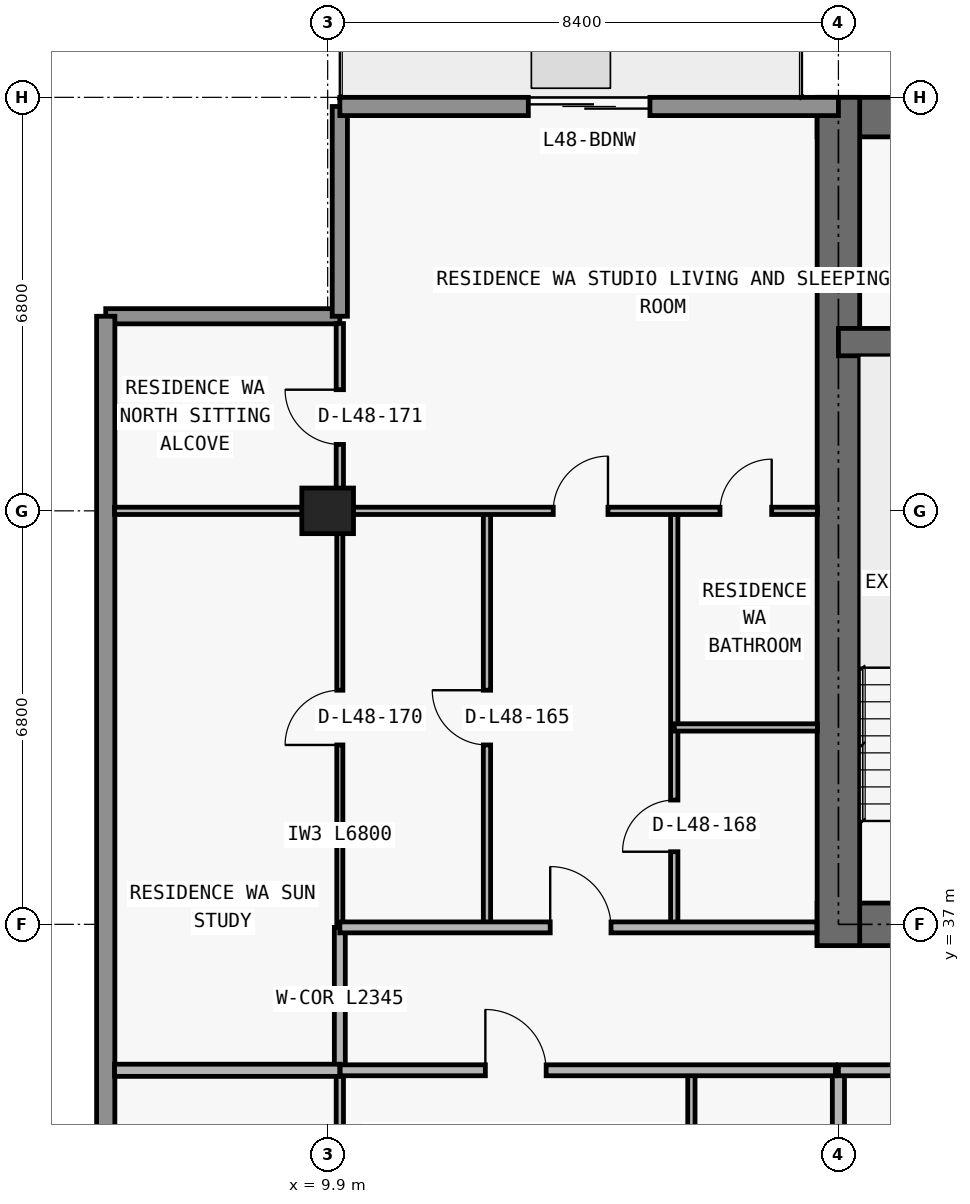
"""IFC4 building model, lengths in metres.
Left out: names, types, materials, properties, quantities, classifications, styles, units other than length and angle.
Written with IfcOpenShell. Run it as: python <this file> out.ifc"""

import sys

from ifc_helpers import new_model, si_unit, direction, frame, frame_2d, origin, origin_2d, place, context, subcontext, project, spatial, rectangle, extrude, element, fill, save


model = new_model("IFC4")
c1 = context("Model", 3, precision=1e-05, world=origin(), true_north=direction((0.0, 1.0)))
c2 = subcontext(c1, "Body", "Model", "MODEL_VIEW")
j1 = project(units=[si_unit("LENGTHUNIT", "METRE"), si_unit("PLANEANGLEUNIT", "RADIAN")], contexts=[c1])
p1 = place(None, origin())
s1 = spatial("IfcSite", under=j1, at=p1, CompositionType="ELEMENT")
p2 = place(p1, origin())
s2 = spatial("IfcBuilding", under=s1, at=p2, CompositionType="ELEMENT")
p3 = place(p2, frame((0.0, 0.0, 173.7)))
s3 = spatial("IfcBuildingStorey", under=s2, at=p3, CompositionType="ELEMENT", Elevation=173.7)
p4 = place(p3, frame((9.9, 43.8, 0.0), z_axis=(0.0, 0.0, 1.0), x_axis=(1.0, 0.0, 0.0)))
e1 = element("IfcColumn", 1, at=p4, inside=s3, PredefinedType="COLUMN", context=c2, shape_type="SweptSolid", body=[
    extrude(rectangle(XDim=0.85, YDim=0.75, at=origin_2d()), origin(), (0.0, 0.0, 1.0), 3.05),
])
p5 = place(p3, frame((17.95, 37.0, 0.0), z_axis=(0.0, 0.0, 1.0), x_axis=(1.0, 0.0, 0.0)))
e2 = element("IfcWall", 2, at=p5, inside=s3, PredefinedType="SHEAR", context=c2, shape_type="SweptSolid", body=[
    extrude(rectangle(XDim=41.9, YDim=0.7, at=frame_2d((20.95, 0.0))), origin(), (0.0, 0.0, 1.0), 3.05),
])
p6 = place(p5, frame((14.35, 0.0, 0.0)))
e3 = element("IfcOpeningElement", 3, at=p6, cuts=e2, PredefinedType="OPENING", context=c2, shape_type="SweptSolid", body=[
    extrude(rectangle(XDim=1.1, YDim=2.15, at=frame_2d((0.55, 1.075))), frame((0.0, 0.36, 0.0), z_axis=(0.0, -1.0, 0.0), x_axis=(1.0, 0.0, 0.0)), (0.0, 0.0, 1.0), 0.72),
])
p7 = place(p5, frame((6.2, 0.0, 0.0)))
e4 = element("IfcOpeningElement", 4, at=p7, cuts=e2, PredefinedType="OPENING", context=c2, shape_type="SweptSolid", body=[
    extrude(rectangle(XDim=1.05, YDim=2.15, at=frame_2d((0.525, 1.075))), frame((0.0, 0.36, 0.0), z_axis=(0.0, -1.0, 0.0), x_axis=(1.0, 0.0, 0.0)), (0.0, 0.0, 1.0), 0.72),
])
p8 = place(p5, frame((34.7, 0.0, 0.0)))
e5 = element("IfcOpeningElement", 5, at=p8, cuts=e2, PredefinedType="OPENING", context=c2, shape_type="SweptSolid", body=[
    extrude(rectangle(XDim=1.05, YDim=2.15, at=frame_2d((0.525, 1.075))), frame((0.0, 0.36, 0.0), z_axis=(0.0, -1.0, 0.0), x_axis=(1.0, 0.0, 0.0)), (0.0, 0.0, 1.0), 0.72),
])
p9 = place(p5, frame((10.812, 0.0, 0.0)))
e6 = element("IfcOpeningElement", 6, at=p9, cuts=e2, PredefinedType="OPENING", context=c2, shape_type="SweptSolid", body=[
    extrude(rectangle(XDim=1.05, YDim=2.15, at=frame_2d((0.525, 1.075))), frame((0.0, 0.36, 0.0), z_axis=(0.0, -1.0, 0.0), x_axis=(1.0, 0.0, 0.0)), (0.0, 0.0, 1.0), 0.72),
])
p10 = place(p5, frame((24.05, 0.0, 0.0)))
e7 = element("IfcOpeningElement", 7, at=p10, cuts=e2, PredefinedType="OPENING", context=c2, shape_type="SweptSolid", body=[
    extrude(rectangle(XDim=1.05, YDim=2.15, at=frame_2d((0.525, 1.075))), frame((0.0, 0.36, 0.0), z_axis=(0.0, -1.0, 0.0), x_axis=(1.0, 0.0, 0.0)), (0.0, 0.0, 1.0), 0.72),
])
p11 = place(p3, frame((17.95, 50.275, 0.0), z_axis=(0.0, 0.0, 1.0), x_axis=(1.0, 0.0, 0.0)))
e8 = element("IfcWall", 8, at=p11, inside=s3, PredefinedType="SHEAR", context=c2, shape_type="SweptSolid", body=[
    extrude(rectangle(XDim=41.9, YDim=0.65, at=frame_2d((20.95, 0.0))), origin(), (0.0, 0.0, 1.0), 3.05),
])
p12 = place(p3, frame((18.3, 36.65, 0.0), z_axis=(0.0, 0.0, 1.0), x_axis=(0.0, 1.0, 0.0)))
e9 = element("IfcWall", 9, at=p12, inside=s3, PredefinedType="SHEAR", context=c2, shape_type="SweptSolid", body=[
    extrude(rectangle(XDim=13.95, YDim=0.7, at=frame_2d((6.975, 0.0))), origin(), (0.0, 0.0, 1.0), 3.05),
])
p13 = place(p3, frame((18.3, 46.575, 0.0), z_axis=(0.0, 0.0, 1.0), x_axis=(1.0, 0.0, 0.0)))
e10 = element("IfcWall", 10, at=p13, inside=s3, PredefinedType="SHEAR", context=c2, shape_type="SweptSolid", body=[
    extrude(rectangle(XDim=41.2, YDim=0.45, at=frame_2d((20.6, 0.0))), origin(), (0.0, 0.0, 1.0), 3.05),
])
p14 = place(p13, frame((7.575, 0.0, 0.0)))
e11 = element("IfcOpeningElement", 11, at=p14, cuts=e10, PredefinedType="OPENING", context=c2, shape_type="SweptSolid", body=[
    extrude(rectangle(XDim=1.05, YDim=2.15, at=frame_2d((0.525, 1.075))), frame((0.0, 0.235, 0.0), z_axis=(0.0, -1.0, 0.0), x_axis=(1.0, 0.0, 0.0)), (0.0, 0.0, 1.0), 0.47),
])
p15 = place(p13, frame((32.625, 0.0, 0.0)))
e12 = element("IfcOpeningElement", 12, at=p15, cuts=e10, PredefinedType="OPENING", context=c2, shape_type="SweptSolid", body=[
    extrude(rectangle(XDim=1.05, YDim=2.15, at=frame_2d((0.525, 1.075))), frame((0.0, 0.235, 0.0), z_axis=(0.0, -1.0, 0.0), x_axis=(1.0, 0.0, 0.0)), (0.0, 0.0, 1.0), 0.47),
])
p16 = place(p3, frame((6.25, 47.0, 0.0), z_axis=(0.0, 0.0, 1.0), x_axis=(1.0, 0.0, 0.0)))
e13 = element("IfcWall", 13, at=p16, inside=s3, PredefinedType="ELEMENTEDWALL", context=c2, shape_type="SweptSolid", body=[
    extrude(rectangle(XDim=3.85, YDim=0.25, at=frame_2d((1.925, 0.0))), origin(), (0.0, 0.0, 1.0), 3.05),
])
p17 = place(p3, frame((10.1, 47.0, 0.0), z_axis=(0.0, 0.0, 1.0), x_axis=(0.0, 1.0, 0.0)))
e14 = element("IfcWall", 14, at=p17, inside=s3, PredefinedType="ELEMENTEDWALL", context=c2, shape_type="SweptSolid", body=[
    extrude(rectangle(XDim=3.45, YDim=0.25, at=frame_2d((1.725, 0.0))), origin(), (0.0, 0.0, 1.0), 3.05),
])
p18 = place(p3, frame((6.25, 29.1, 0.0), z_axis=(0.0, 0.0, 1.0), x_axis=(0.0, 1.0, 0.0)))
e15 = element("IfcWall", 15, at=p18, inside=s3, PredefinedType="STANDARD", context=c2, shape_type="SweptSolid", body=[
    extrude(rectangle(XDim=17.9, YDim=0.3, at=frame_2d((8.95, 0.0))), origin(), (0.0, 0.0, 1.0), 3.05),
])
p19 = place(p3, frame((10.1, 50.45, 0.0), z_axis=(0.0, 0.0, 1.0), x_axis=(1.0, 0.0, 0.0)))
e16 = element("IfcWall", 16, at=p19, inside=s3, PredefinedType="STANDARD", context=c2, shape_type="SweptSolid", body=[
    extrude(rectangle(XDim=8.2, YDim=0.3, at=frame_2d((4.1, 0.0))), origin(), (0.0, 0.0, 1.0), 3.05),
])
p20 = place(p19, frame((3.1, 0.0, 0.0)))
e17 = element("IfcOpeningElement", 17, at=p20, cuts=e16, PredefinedType="OPENING", context=c2, shape_type="SweptSolid", body=[
    extrude(rectangle(XDim=2.0, YDim=2.3, at=frame_2d((1.0, 1.15))), frame((0.0, 0.16, 0.0), z_axis=(0.0, -1.0, 0.0), x_axis=(1.0, 0.0, 0.0)), (0.0, 0.0, 1.0), 0.32),
])
p21 = place(p3, frame((10.1, 30.34, 0.0), z_axis=(0.0, 0.0, 1.0), x_axis=(0.0, 1.0, 0.0)))
e18 = element("IfcWall", 18, at=p21, inside=s3, PredefinedType="PARTITIONING", context=c2, shape_type="SweptSolid", body=[
    extrude(rectangle(XDim=4.26, YDim=0.12, at=frame_2d((2.13, 0.0))), origin(), (0.0, 0.0, 1.0), 2.263),
])
p22 = place(p3, frame((10.1, 34.605, 0.0), z_axis=(0.0, 0.0, 1.0), x_axis=(0.0, 1.0, 0.0)))
e19 = element("IfcWall", 19, at=p22, inside=s3, PredefinedType="PARTITIONING", context=c2, shape_type="SweptSolid", body=[
    extrude(rectangle(XDim=2.345, YDim=0.18, at=frame_2d((1.172, 0.0))), origin(), (0.0, 0.0, 1.0), 2.263),
])
p23 = place(p3, frame((10.1, 37.0, 0.0), z_axis=(0.0, 0.0, 1.0), x_axis=(0.0, 1.0, 0.0)))
e20 = element("IfcWall", 20, at=p23, inside=s3, PredefinedType="MOVABLE", context=c2, shape_type="SweptSolid", body=[
    extrude(rectangle(XDim=6.8, YDim=0.1, at=frame_2d((3.4, 0.0))), origin(), (0.0, 0.0, 1.0), 2.263),
])
p24 = place(p23, frame((2.95, 0.0, 0.0)))
e21 = element("IfcOpeningElement", 21, at=p24, cuts=e20, PredefinedType="OPENING", context=c2, shape_type="SweptSolid", body=[
    extrude(rectangle(XDim=0.9, YDim=2.15, at=frame_2d((0.45, 1.075))), frame((0.0, 0.06, 0.0), z_axis=(0.0, -1.0, 0.0), x_axis=(1.0, 0.0, 0.0)), (0.0, 0.0, 1.0), 0.12),
])
p25 = place(p3, frame((10.1, 43.805, 0.0), z_axis=(0.0, 0.0, 1.0), x_axis=(0.0, 1.0, 0.0)))
e22 = element("IfcWall", 22, at=p25, inside=s3, PredefinedType="PARTITIONING", context=c2, shape_type="SweptSolid", body=[
    extrude(rectangle(XDim=3.075, YDim=0.12, at=frame_2d((1.538, 0.0))), origin(), (0.0, 0.0, 1.0), 3.05),
])
p26 = place(p25, frame((1.087, 0.0, 0.0)))
e23 = element("IfcOpeningElement", 23, at=p26, cuts=e22, PredefinedType="OPENING", context=c2, shape_type="SweptSolid", body=[
    extrude(rectangle(XDim=0.9, YDim=2.15, at=frame_2d((0.45, 1.075))), frame((0.0, 0.07, 0.0), z_axis=(0.0, -1.0, 0.0), x_axis=(1.0, 0.0, 0.0)), (0.0, 0.0, 1.0), 0.14),
])
p27 = place(p3, frame((12.52, 37.0, 0.0), z_axis=(0.0, 0.0, 1.0), x_axis=(0.0, 1.0, 0.0)))
e24 = element("IfcWall", 24, at=p27, inside=s3, PredefinedType="PARTITIONING", context=c2, shape_type="SweptSolid", body=[
    extrude(rectangle(XDim=6.8, YDim=0.12, at=frame_2d((3.4, 0.0))), origin(), (0.0, 0.0, 1.0), 2.578),
])
p28 = place(p27, frame((2.95, 0.0, 0.0)))
e25 = element("IfcOpeningElement", 25, at=p28, cuts=e24, PredefinedType="OPENING", context=c2, shape_type="SweptSolid", body=[
    extrude(rectangle(XDim=0.9, YDim=2.15, at=frame_2d((0.45, 1.075))), frame((0.0, 0.07, 0.0), z_axis=(0.0, -1.0, 0.0), x_axis=(1.0, 0.0, 0.0)), (0.0, 0.0, 1.0), 0.14),
])
p29 = place(p3, frame((15.6, 37.0, 0.0), z_axis=(0.0, 0.0, 1.0), x_axis=(0.0, 1.0, 0.0)))
e26 = element("IfcWall", 26, at=p29, inside=s3, PredefinedType="PARTITIONING", context=c2, shape_type="SweptSolid", body=[
    extrude(rectangle(XDim=6.8, YDim=0.12, at=frame_2d((3.4, 0.0))), origin(), (0.0, 0.0, 1.0), 2.679),
])
p30 = place(p29, frame((1.194, 0.0, 0.0)))
e27 = element("IfcOpeningElement", 27, at=p30, cuts=e26, PredefinedType="OPENING", context=c2, shape_type="SweptSolid", body=[
    extrude(rectangle(XDim=0.85, YDim=2.1, at=frame_2d((0.425, 1.05))), frame((0.0, 0.07, 0.0), z_axis=(0.0, -1.0, 0.0), x_axis=(1.0, 0.0, 0.0)), (0.0, 0.0, 1.0), 0.14),
])
p31 = place(p3, frame((15.882, 30.34, 0.0), z_axis=(0.0, 0.0, 1.0), x_axis=(0.0, 1.0, 0.0)))
e28 = element("IfcWall", 28, at=p31, inside=s3, PredefinedType="PARTITIONING", context=c2, shape_type="SweptSolid", body=[
    extrude(rectangle(XDim=4.26, YDim=0.12, at=frame_2d((2.13, 0.0))), origin(), (0.0, 0.0, 1.0), 3.05),
])
p32 = place(p31, frame((1.705, 0.0, 0.0)))
e29 = element("IfcOpeningElement", 29, at=p32, cuts=e28, PredefinedType="OPENING", context=c2, shape_type="SweptSolid", body=[
    extrude(rectangle(XDim=0.85, YDim=2.1, at=frame_2d((0.425, 1.05))), frame((0.0, 0.07, 0.0), z_axis=(0.0, -1.0, 0.0), x_axis=(1.0, 0.0, 0.0)), (0.0, 0.0, 1.0), 0.14),
])
p33 = place(p3, frame((18.3, 30.34, 0.0), z_axis=(0.0, 0.0, 1.0), x_axis=(0.0, 1.0, 0.0)))
e30 = element("IfcWall", 30, at=p33, inside=s3, PredefinedType="PARTITIONING", context=c2, shape_type="SweptSolid", body=[
    extrude(rectangle(XDim=4.26, YDim=0.2, at=frame_2d((2.13, 0.0))), origin(), (0.0, 0.0, 1.0), 2.263),
])
p34 = place(p3, frame((6.395, 34.6, 0.0), z_axis=(0.0, 0.0, 1.0), x_axis=(1.0, 0.0, 0.0)))
e31 = element("IfcWall", 31, at=p34, inside=s3, PredefinedType="PARTITIONING", context=c2, shape_type="SweptSolid", body=[
    extrude(rectangle(XDim=3.705, YDim=0.2, at=frame_2d((1.853, 0.0))), origin(), (0.0, 0.0, 1.0), 3.05),
])
p35 = place(p3, frame((10.105, 34.6, 0.0), z_axis=(0.0, 0.0, 1.0), x_axis=(1.0, 0.0, 0.0)))
e32 = element("IfcWall", 32, at=p35, inside=s3, PredefinedType="PARTITIONING", context=c2, shape_type="SweptSolid", body=[
    extrude(rectangle(XDim=8.145, YDim=0.18, at=frame_2d((4.073, 0.0))), origin(), (0.0, 0.0, 1.0), 3.05),
])
p36 = place(p35, frame((2.388, 0.0, 0.0)))
e33 = element("IfcOpeningElement", 33, at=p36, cuts=e32, PredefinedType="OPENING", context=c2, shape_type="SweptSolid", body=[
    extrude(rectangle(XDim=1.0, YDim=2.2, at=frame_2d((0.5, 1.1))), frame((0.0, 0.1, 0.0), z_axis=(0.0, -1.0, 0.0), x_axis=(1.0, 0.0, 0.0)), (0.0, 0.0, 1.0), 0.2),
])
p37 = place(p3, frame((18.3, 34.6, 0.0), z_axis=(0.0, 0.0, 1.0), x_axis=(1.0, 0.0, 0.0)))
e34 = element("IfcWall", 34, at=p37, inside=s3, PredefinedType="PARTITIONING", context=c2, shape_type="SweptSolid", body=[
    extrude(rectangle(XDim=41.2, YDim=0.18, at=frame_2d((20.6, 0.0))), origin(), (0.0, 0.0, 1.0), 3.05),
])
p38 = place(p37, frame((2.67, 0.0, 0.0)))
e35 = element("IfcOpeningElement", 35, at=p38, cuts=e34, PredefinedType="OPENING", context=c2, shape_type="SweptSolid", body=[
    extrude(rectangle(XDim=1.0, YDim=2.2, at=frame_2d((0.5, 1.1))), frame((0.0, 0.1, 0.0), z_axis=(0.0, -1.0, 0.0), x_axis=(1.0, 0.0, 0.0)), (0.0, 0.0, 1.0), 0.2),
])
p39 = place(p37, frame((11.212, 0.0, 0.0)))
e36 = element("IfcOpeningElement", 36, at=p39, cuts=e34, PredefinedType="OPENING", context=c2, shape_type="SweptSolid", body=[
    extrude(rectangle(XDim=1.0, YDim=2.2, at=frame_2d((0.5, 1.1))), frame((0.0, 0.1, 0.0), z_axis=(0.0, -1.0, 0.0), x_axis=(1.0, 0.0, 0.0)), (0.0, 0.0, 1.0), 0.2),
])
p40 = place(p37, frame((35.483, 0.0, 0.0)))
e37 = element("IfcOpeningElement", 37, at=p40, cuts=e34, PredefinedType="OPENING", context=c2, shape_type="SweptSolid", body=[
    extrude(rectangle(XDim=1.0, YDim=2.2, at=frame_2d((0.5, 1.1))), frame((0.0, 0.1, 0.0), z_axis=(0.0, -1.0, 0.0), x_axis=(1.0, 0.0, 0.0)), (0.0, 0.0, 1.0), 0.2),
])
p41 = place(p3, frame((10.1, 36.95, 0.0), z_axis=(0.0, 0.0, 1.0), x_axis=(1.0, 0.0, 0.0)))
e38 = element("IfcWall", 38, at=p41, inside=s3, PredefinedType="PARTITIONING", context=c2, shape_type="SweptSolid", body=[
    extrude(rectangle(XDim=7.845, YDim=0.18, at=frame_2d((3.922, 0.0))), origin(), (0.0, 0.0, 1.0), 3.05),
])
p42 = place(p41, frame((3.46, 0.0, 0.0)))
e39 = element("IfcOpeningElement", 39, at=p42, cuts=e38, PredefinedType="OPENING", context=c2, shape_type="SweptSolid", body=[
    extrude(rectangle(XDim=1.0, YDim=2.2, at=frame_2d((0.5, 1.1))), frame((0.0, 0.1, 0.0), z_axis=(0.0, -1.0, 0.0), x_axis=(1.0, 0.0, 0.0)), (0.0, 0.0, 1.0), 0.2),
])
p43 = place(p3, frame((15.6, 40.238, 0.0), z_axis=(0.0, 0.0, 1.0), x_axis=(1.0, 0.0, 0.0)))
e40 = element("IfcWall", 40, at=p43, inside=s3, PredefinedType="PARTITIONING", context=c2, shape_type="SweptSolid", body=[
    extrude(rectangle(XDim=2.355, YDim=0.12, at=frame_2d((1.177, 0.0))), origin(), (0.0, 0.0, 1.0), 3.05),
])
p44 = place(p3, frame((6.395, 43.8, 0.0), z_axis=(0.0, 0.0, 1.0), x_axis=(1.0, 0.0, 0.0)))
e41 = element("IfcWall", 41, at=p44, inside=s3, PredefinedType="PARTITIONING", context=c2, shape_type="SweptSolid", body=[
    extrude(rectangle(XDim=11.56, YDim=0.12, at=frame_2d((5.78, 0.0))), origin(), (0.0, 0.0, 1.0), 2.418),
])
p45 = place(p44, frame((7.215, 0.0, 0.0)))
e42 = element("IfcOpeningElement", 42, at=p45, cuts=e41, PredefinedType="OPENING", context=c2, shape_type="SweptSolid", body=[
    extrude(rectangle(XDim=0.9, YDim=2.15, at=frame_2d((0.45, 1.075))), frame((0.0, 0.07, 0.0), z_axis=(0.0, -1.0, 0.0), x_axis=(1.0, 0.0, 0.0)), (0.0, 0.0, 1.0), 0.14),
])
p46 = place(p44, frame((9.958, 0.0, 0.0)))
e43 = element("IfcOpeningElement", 43, at=p46, cuts=e41, PredefinedType="OPENING", context=c2, shape_type="SweptSolid", body=[
    extrude(rectangle(XDim=0.85, YDim=2.1, at=frame_2d((0.425, 1.05))), frame((0.0, 0.07, 0.0), z_axis=(0.0, -1.0, 0.0), x_axis=(1.0, 0.0, 0.0)), (0.0, 0.0, 1.0), 0.14),
])
p47 = place(p20, origin())
e44 = element("IfcDoor", 44, at=p47, inside=s3, OperationType="DOUBLE_DOOR_SLIDING", PredefinedType="DOOR", context=c2, shape_type="SweptSolid", body=[
    extrude(rectangle(XDim=2.0, YDim=2.3, at=frame_2d((1.0, 1.15))), frame((0.0, 0.025, 0.0), z_axis=(0.0, -1.0, 0.0), x_axis=(1.0, 0.0, 0.0)), (0.0, 0.0, 1.0), 0.05),
])
fill(e17, e44)
p48 = place(p36, origin())
e45 = element("IfcDoor", 45, at=p48, inside=s3, OperationType="SINGLE_SWING_LEFT", PredefinedType="DOOR", context=c2, shape_type="SweptSolid", body=[
    extrude(rectangle(XDim=1.0, YDim=2.2, at=frame_2d((0.5, 1.1))), frame((0.0, 0.025, 0.0), z_axis=(0.0, -1.0, 0.0), x_axis=(1.0, 0.0, 0.0)), (0.0, 0.0, 1.0), 0.05),
])
fill(e33, e45)
p49 = place(p28, origin())
e46 = element("IfcDoor", 46, at=p49, inside=s3, OperationType="SINGLE_SWING_RIGHT", PredefinedType="DOOR", context=c2, shape_type="SweptSolid", body=[
    extrude(rectangle(XDim=0.9, YDim=2.15, at=frame_2d((0.45, 1.075))), frame((0.0, 0.025, 0.0), z_axis=(0.0, -1.0, 0.0), x_axis=(1.0, 0.0, 0.0)), (0.0, 0.0, 1.0), 0.05),
])
fill(e25, e46)
p50 = place(p42, origin())
e47 = element("IfcDoor", 47, at=p50, inside=s3, OperationType="SINGLE_SWING_LEFT", PredefinedType="DOOR", context=c2, shape_type="SweptSolid", body=[
    extrude(rectangle(XDim=1.0, YDim=2.2, at=frame_2d((0.5, 1.1))), frame((0.0, 0.025, 0.0), z_axis=(0.0, -1.0, 0.0), x_axis=(1.0, 0.0, 0.0)), (0.0, 0.0, 1.0), 0.05),
])
fill(e39, e47)
p51 = place(p45, origin())
e48 = element("IfcDoor", 48, at=p51, inside=s3, OperationType="SINGLE_SWING_RIGHT", PredefinedType="DOOR", context=c2, shape_type="SweptSolid", body=[
    extrude(rectangle(XDim=0.9, YDim=2.15, at=frame_2d((0.45, 1.075))), frame((0.0, 0.025, 0.0), z_axis=(0.0, -1.0, 0.0), x_axis=(1.0, 0.0, 0.0)), (0.0, 0.0, 1.0), 0.05),
])
fill(e42, e48)
p52 = place(p30, origin())
e49 = element("IfcDoor", 49, at=p52, inside=s3, OperationType="SINGLE_SWING_LEFT", PredefinedType="DOOR", context=c2, shape_type="SweptSolid", body=[
    extrude(rectangle(XDim=0.85, YDim=2.1, at=frame_2d((0.425, 1.05))), frame((0.0, 0.025, 0.0), z_axis=(0.0, -1.0, 0.0), x_axis=(1.0, 0.0, 0.0)), (0.0, 0.0, 1.0), 0.05),
])
fill(e27, e49)
p53 = place(p46, origin())
e50 = element("IfcDoor", 50, at=p53, inside=s3, OperationType="SINGLE_SWING_RIGHT", PredefinedType="DOOR", context=c2, shape_type="SweptSolid", body=[
    extrude(rectangle(XDim=0.85, YDim=2.1, at=frame_2d((0.425, 1.05))), frame((0.0, 0.025, 0.0), z_axis=(0.0, -1.0, 0.0), x_axis=(1.0, 0.0, 0.0)), (0.0, 0.0, 1.0), 0.05),
])
fill(e43, e50)
p54 = place(p24, origin())
e51 = element("IfcDoor", 51, at=p54, inside=s3, OperationType="SINGLE_SWING_LEFT", PredefinedType="DOOR", context=c2, shape_type="SweptSolid", body=[
    extrude(rectangle(XDim=0.9, YDim=2.15, at=frame_2d((0.45, 1.075))), frame((0.0, 0.025, 0.0), z_axis=(0.0, -1.0, 0.0), x_axis=(1.0, 0.0, 0.0)), (0.0, 0.0, 1.0), 0.05),
])
fill(e21, e51)
p55 = place(p26, origin())
e52 = element("IfcDoor", 52, at=p55, inside=s3, OperationType="SINGLE_SWING_RIGHT", PredefinedType="DOOR", context=c2, shape_type="SweptSolid", body=[
    extrude(rectangle(XDim=0.9, YDim=2.15, at=frame_2d((0.45, 1.075))), frame((0.0, 0.025, 0.0), z_axis=(0.0, -1.0, 0.0), x_axis=(1.0, 0.0, 0.0)), (0.0, 0.0, 1.0), 0.05),
])
fill(e23, e52)
save(model, sys.argv[1])
